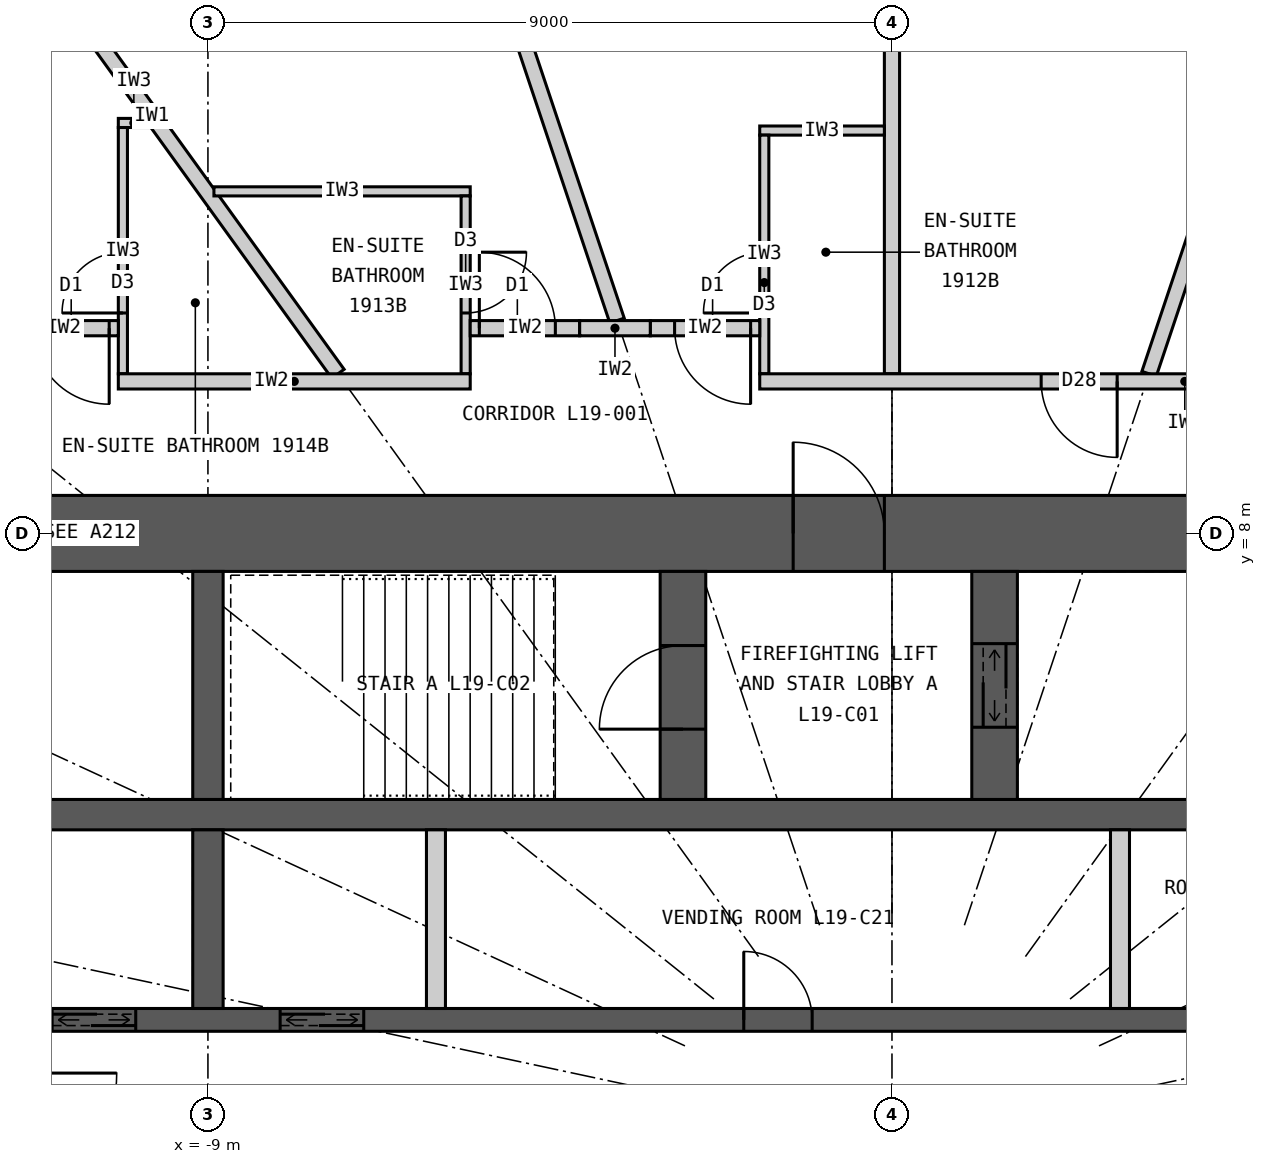
"""IFC4 building model, lengths in metres.
Left out: names, types, materials, properties, quantities, classifications, styles, units other than length and angle.
Written with IfcOpenShell. Run it as: python <this file> out.ifc"""

import sys

from ifc_helpers import new_model, si_unit, direction, frame, frame_2d, origin, place, context, subcontext, project, spatial, rectangle, extrude, element, fill, save


model = new_model("IFC4")
c1 = context("Model", 3, precision=1e-05, world=origin(), true_north=direction((0.0, 1.0)))
c2 = subcontext(c1, "Body", "Model", "MODEL_VIEW")
j1 = project(units=[si_unit("LENGTHUNIT", "METRE"), si_unit("PLANEANGLEUNIT", "RADIAN")], contexts=[c1])
p1 = place(None, origin())
s1 = spatial("IfcSite", under=j1, at=p1, CompositionType="ELEMENT")
p2 = place(p1, origin())
s2 = spatial("IfcBuilding", under=s1, at=p2, CompositionType="ELEMENT")
p3 = place(p2, frame((0.0, 0.0, 77.1)))
s3 = spatial("IfcBuildingStorey", under=s2, at=p3, CompositionType="ELEMENT", Elevation=77.1)
p4 = place(p3, frame((-12.5, 8.0, 0.0), z_axis=(0.0, 0.0, 1.0), x_axis=(1.0, 0.0, 0.0)))
e1 = element("IfcWall", 1, at=p4, inside=s3, PredefinedType="SHEAR", context=c2, shape_type="SweptSolid", body=[
    extrude(rectangle(XDim=25.0, YDim=1.0, at=frame_2d((12.5, 0.0))), origin(), (0.0, 0.0, 1.0), 3.3),
])
p5 = place(p4, frame((11.2, 0.0, 0.0)))
e2 = element("IfcOpeningElement", 2, at=p5, cuts=e1, PredefinedType="OPENING", context=c2, shape_type="SweptSolid", body=[
    extrude(rectangle(XDim=1.2, YDim=2.2, at=frame_2d((0.6, 1.1))), frame((0.0, 0.51, 0.0), z_axis=(0.0, -1.0, 0.0), x_axis=(1.0, 0.0, 0.0)), (0.0, 0.0, 1.0), 1.02),
])
p6 = place(p4, frame((18.8, 0.0, 0.0)))
e3 = element("IfcOpeningElement", 3, at=p6, cuts=e1, PredefinedType="OPENING", context=c2, shape_type="SweptSolid", body=[
    extrude(rectangle(XDim=0.9, YDim=2.2, at=frame_2d((0.45, 1.1))), frame((0.0, 0.51, 0.0), z_axis=(0.0, -1.0, 0.0), x_axis=(1.0, 0.0, 0.0)), (0.0, 0.0, 1.0), 1.02),
])
p7 = place(p3, frame((-11.5, 4.3, 0.0), z_axis=(0.0, 0.0, 1.0), x_axis=(1.0, 0.0, 0.0)))
e4 = element("IfcWall", 4, at=p7, inside=s3, PredefinedType="SHEAR", context=c2, shape_type="SweptSolid", body=[
    extrude(rectangle(XDim=23.0, YDim=0.4, at=frame_2d((11.5, 0.0))), origin(), (0.0, 0.0, 1.0), 3.3),
])
p8 = place(p3, frame((-11.5, 1.6, 0.0), z_axis=(0.0, 0.0, 1.0), x_axis=(1.0, 0.0, 0.0)))
e5 = element("IfcWall", 5, at=p8, inside=s3, PredefinedType="SHEAR", context=c2, shape_type="SweptSolid", body=[
    extrude(rectangle(XDim=23.0, YDim=0.3, at=frame_2d((11.5, 0.0))), origin(), (0.0, 0.0, 1.0), 3.3),
])
p9 = place(p8, frame((0.45, 0.0, 0.0)))
e6 = element("IfcOpeningElement", 6, at=p9, cuts=e5, PredefinedType="OPENING", context=c2, shape_type="SweptSolid", body=[
    extrude(rectangle(XDim=1.1, YDim=2.2, at=frame_2d((0.55, 1.1))), frame((0.0, 0.16, 0.0), z_axis=(0.0, -1.0, 0.0), x_axis=(1.0, 0.0, 0.0)), (0.0, 0.0, 1.0), 0.32),
])
p10 = place(p8, frame((3.45, 0.0, 0.0)))
e7 = element("IfcOpeningElement", 7, at=p10, cuts=e5, PredefinedType="OPENING", context=c2, shape_type="SweptSolid", body=[
    extrude(rectangle(XDim=1.1, YDim=2.2, at=frame_2d((0.55, 1.1))), frame((0.0, 0.16, 0.0), z_axis=(0.0, -1.0, 0.0), x_axis=(1.0, 0.0, 0.0)), (0.0, 0.0, 1.0), 0.32),
])
p11 = place(p8, frame((9.55, 0.0, 0.0)))
e8 = element("IfcOpeningElement", 8, at=p11, cuts=e5, PredefinedType="OPENING", context=c2, shape_type="SweptSolid", body=[
    extrude(rectangle(XDim=0.9, YDim=2.2, at=frame_2d((0.45, 1.1))), frame((0.0, 0.16, 0.0), z_axis=(0.0, -1.0, 0.0), x_axis=(1.0, 0.0, 0.0)), (0.0, 0.0, 1.0), 0.32),
])
p12 = place(p8, frame((15.55, 0.0, 0.0)))
e9 = element("IfcOpeningElement", 9, at=p12, cuts=e5, PredefinedType="OPENING", context=c2, shape_type="SweptSolid", body=[
    extrude(rectangle(XDim=0.9, YDim=2.2, at=frame_2d((0.45, 1.1))), frame((0.0, 0.16, 0.0), z_axis=(0.0, -1.0, 0.0), x_axis=(1.0, 0.0, 0.0)), (0.0, 0.0, 1.0), 0.32),
])
p13 = place(p3, frame((-9.0, 4.5, 0.0), z_axis=(0.0, 0.0, 1.0), x_axis=(0.0, 1.0, 0.0)))
e10 = element("IfcWall", 10, at=p13, inside=s3, PredefinedType="SHEAR", context=c2, shape_type="SweptSolid", body=[
    extrude(rectangle(XDim=3.0, YDim=0.4, at=frame_2d((1.5, 0.0))), origin(), (0.0, 0.0, 1.0), 3.3),
])
p14 = place(p3, frame((-9.0, 1.75, 0.0), z_axis=(0.0, 0.0, 1.0), x_axis=(0.0, 1.0, 0.0)))
e11 = element("IfcWall", 11, at=p14, inside=s3, PredefinedType="SHEAR", context=c2, shape_type="SweptSolid", body=[
    extrude(rectangle(XDim=2.35, YDim=0.4, at=frame_2d((1.175, 0.0))), origin(), (0.0, 0.0, 1.0), 3.3),
])
p15 = place(p3, frame((-2.75, 4.5, 0.0), z_axis=(0.0, 0.0, 1.0), x_axis=(0.0, 1.0, 0.0)))
e12 = element("IfcWall", 12, at=p15, inside=s3, PredefinedType="SHEAR", context=c2, shape_type="SweptSolid", body=[
    extrude(rectangle(XDim=3.0, YDim=0.6, at=frame_2d((1.5, 0.0))), origin(), (0.0, 0.0, 1.0), 3.3),
])
p16 = place(p15, frame((0.925, 0.0, 0.0)))
e13 = element("IfcOpeningElement", 13, at=p16, cuts=e12, PredefinedType="OPENING", context=c2, shape_type="SweptSolid", body=[
    extrude(rectangle(XDim=1.1, YDim=2.2, at=frame_2d((0.55, 1.1))), frame((0.0, 0.31, 0.0), z_axis=(0.0, -1.0, 0.0), x_axis=(1.0, 0.0, 0.0)), (0.0, 0.0, 1.0), 0.62),
])
p17 = place(p3, frame((1.35, 4.5, 0.0), z_axis=(0.0, 0.0, 1.0), x_axis=(0.0, 1.0, 0.0)))
e14 = element("IfcWall", 14, at=p17, inside=s3, PredefinedType="SHEAR", context=c2, shape_type="SweptSolid", body=[
    extrude(rectangle(XDim=3.0, YDim=0.6, at=frame_2d((1.5, 0.0))), origin(), (0.0, 0.0, 1.0), 3.3),
])
p18 = place(p17, frame((0.95, 0.0, 0.0)))
e15 = element("IfcOpeningElement", 15, at=p18, cuts=e14, PredefinedType="OPENING", context=c2, shape_type="SweptSolid", body=[
    extrude(rectangle(XDim=1.1, YDim=2.2, at=frame_2d((0.55, 1.1))), frame((0.0, 0.31, 0.0), z_axis=(0.0, -1.0, 0.0), x_axis=(1.0, 0.0, 0.0)), (0.0, 0.0, 1.0), 0.62),
])
for number, where, z_axis, x_axis in (
    (16, (-6.0, 1.75, 0.0), (0.0, 0.0, 1.0), (0.0, 1.0, 0.0)),
    (17, (3.0, 1.75, 0.0), (0.0, 0.0, 1.0), (0.0, 1.0, 0.0)),
):
    element("IfcWall", number, at=place(p3, frame(where, z_axis=z_axis, x_axis=x_axis)), inside=s3, PredefinedType="PARTITIONING", context=c2, shape_type="SweptSolid", body=[
        extrude(rectangle(XDim=2.35, YDim=0.25, at=frame_2d((1.175, 0.0))), origin(), (0.0, 0.0, 1.0), 3.3),
    ])
p19 = place(p3, frame((3.383, 10.1, 0.0), z_axis=(0.0, 0.0, 1.0), x_axis=(0.31759592231, 0.948226149256, 0.0)))
e18 = element("IfcWall", 18, at=p19, inside=s3, PredefinedType="PARTITIONING", context=c2, shape_type="SweptSolid", body=[
    extrude(rectangle(XDim=9.098, YDim=0.2, at=frame_2d((4.549, 0.0))), origin(), (0.0, 0.0, 1.0), 2.32),
])
p20 = place(p3, frame((0.0, 10.1, 0.0), z_axis=(0.0, 0.0, 1.0), x_axis=(0.0, 1.0, 0.0)))
e19 = element("IfcWall", 19, at=p20, inside=s3, PredefinedType="PARTITIONING", context=c2, shape_type="SweptSolid", body=[
    extrude(rectangle(XDim=9.25, YDim=0.2, at=frame_2d((4.625, 0.0))), origin(), (0.0, 0.0, 1.0), 2.32),
])
p21 = place(p3, frame((-3.617, 10.8, 0.0), z_axis=(0.0, 0.0, 1.0), x_axis=(-0.317576599239, 0.948232621046, 0.0)))
e20 = element("IfcWall", 20, at=p21, inside=s3, PredefinedType="PARTITIONING", context=c2, shape_type="SweptSolid", body=[
    extrude(rectangle(XDim=8.36, YDim=0.2, at=frame_2d((4.18, 0.0))), origin(), (0.0, 0.0, 1.0), 2.32),
])
p22 = place(p3, frame((-7.289, 10.1, 0.0), z_axis=(0.0, 0.0, 1.0), x_axis=(-0.585198353053, 0.810890182197, 0.0)))
e21 = element("IfcWall", 21, at=p22, inside=s3, PredefinedType="PARTITIONING", context=c2, shape_type="SweptSolid", body=[
    extrude(rectangle(XDim=8.36, YDim=0.2, at=frame_2d((4.18, 0.0))), origin(), (0.0, 0.0, 1.0), 2.32),
])
p23 = place(p3, frame((-0.1, 13.3, 0.0), z_axis=(0.0, 0.0, 1.0), x_axis=(-1.0, 0.0, 0.0)))
e22 = element("IfcWall", 22, at=p23, inside=s3, PredefinedType="PARTITIONING", context=c2, shape_type="SweptSolid", body=[
    extrude(rectangle(XDim=1.64, YDim=0.12, at=frame_2d((0.82, 0.0))), origin(), (0.0, 0.0, 1.0), 3.12),
])
p24 = place(p3, frame((-1.68, 10.1, 0.0), z_axis=(0.0, 0.0, 1.0), x_axis=(0.0, 1.0, 0.0)))
e23 = element("IfcWall", 23, at=p24, inside=s3, PredefinedType="PARTITIONING", context=c2, shape_type="SweptSolid", body=[
    extrude(rectangle(XDim=3.14, YDim=0.12, at=frame_2d((1.57, 0.0))), origin(), (0.0, 0.0, 1.0), 3.12),
])
p25 = place(p24, frame((0.8, 0.0, 0.0)))
e24 = element("IfcOpeningElement", 24, at=p25, cuts=e23, PredefinedType="OPENING", context=c2, shape_type="SweptSolid", body=[
    extrude(rectangle(XDim=0.8, YDim=2.1, at=frame_2d((0.4, 1.05))), frame((0.0, 0.07, 0.0), z_axis=(0.0, -1.0, 0.0), x_axis=(1.0, 0.0, 0.0)), (0.0, 0.0, 1.0), 0.14),
])
p26 = place(p3, frame((-8.921, 12.5, 0.0), z_axis=(0.0, 0.0, 1.0), x_axis=(1.0, 0.0, 0.0)))
e25 = element("IfcWall", 25, at=p26, inside=s3, PredefinedType="PARTITIONING", context=c2, shape_type="SweptSolid", body=[
    extrude(rectangle(XDim=3.372, YDim=0.12, at=frame_2d((1.686, 0.0))), origin(), (0.0, 0.0, 1.0), 3.12),
])
p27 = place(p3, frame((-5.609, 10.1, 0.0), z_axis=(0.0, 0.0, 1.0), x_axis=(0.0, 1.0, 0.0)))
e26 = element("IfcWall", 26, at=p27, inside=s3, PredefinedType="PARTITIONING", context=c2, shape_type="SweptSolid", body=[
    extrude(rectangle(XDim=2.34, YDim=0.12, at=frame_2d((1.17, 0.0))), origin(), (0.0, 0.0, 1.0), 3.12),
])
p28 = place(p27, frame((0.8, 0.0, 0.0)))
e27 = element("IfcOpeningElement", 27, at=p28, cuts=e26, PredefinedType="OPENING", context=c2, shape_type="SweptSolid", body=[
    extrude(rectangle(XDim=0.8, YDim=2.1, at=frame_2d((0.4, 1.05))), frame((0.0, 0.07, 0.0), z_axis=(0.0, -1.0, 0.0), x_axis=(1.0, 0.0, 0.0)), (0.0, 0.0, 1.0), 0.14),
])
p29 = place(p3, frame((-9.771, 13.4, 0.0), z_axis=(0.0, 0.0, 1.0), x_axis=(-1.0, 0.0, 0.0)))
e28 = element("IfcWall", 28, at=p29, inside=s3, PredefinedType="PARTITIONING", context=c2, shape_type="SweptSolid", body=[
    extrude(rectangle(XDim=0.408, YDim=0.12, at=frame_2d((0.204, 0.0))), origin(), (0.0, 0.0, 1.0), 3.12),
])
p30 = place(p3, frame((-10.119, 10.1, 0.0), z_axis=(0.0, 0.0, 1.0), x_axis=(0.0, 1.0, 0.0)))
e29 = element("IfcWall", 29, at=p30, inside=s3, PredefinedType="PARTITIONING", context=c2, shape_type="SweptSolid", body=[
    extrude(rectangle(XDim=3.24, YDim=0.12, at=frame_2d((1.62, 0.0))), origin(), (0.0, 0.0, 1.0), 3.12),
])
p31 = place(p30, frame((0.8, 0.0, 0.0)))
e30 = element("IfcOpeningElement", 30, at=p31, cuts=e29, PredefinedType="OPENING", context=c2, shape_type="SweptSolid", body=[
    extrude(rectangle(XDim=0.8, YDim=2.1, at=frame_2d((0.4, 1.05))), frame((0.0, 0.07, 0.0), z_axis=(0.0, -1.0, 0.0), x_axis=(1.0, 0.0, 0.0)), (0.0, 0.0, 1.0), 0.14),
])
p32 = place(p3, frame((-3.18, 10.7, 0.0), z_axis=(0.0, 0.0, 1.0), x_axis=(1.0, 0.0, 0.0)))
e31 = element("IfcWall", 31, at=p32, inside=s3, PredefinedType="PARTITIONING", context=c2, shape_type="SweptSolid", body=[
    extrude(rectangle(XDim=1.44, YDim=0.2, at=frame_2d((0.72, 0.0))), origin(), (0.0, 0.0, 1.0), 3.12),
])
p33 = place(p32, frame((0.32, 0.0, 0.0)))
e32 = element("IfcOpeningElement", 32, at=p33, cuts=e31, PredefinedType="OPENING", context=c2, shape_type="SweptSolid", body=[
    extrude(rectangle(XDim=1.0, YDim=2.2, at=frame_2d((0.5, 1.1))), frame((0.0, 0.11, 0.0), z_axis=(0.0, -1.0, 0.0), x_axis=(1.0, 0.0, 0.0)), (0.0, 0.0, 1.0), 0.22),
])
p34 = place(p3, frame((-5.549, 10.7, 0.0), z_axis=(0.0, 0.0, 1.0), x_axis=(1.0, 0.0, 0.0)))
e33 = element("IfcWall", 33, at=p34, inside=s3, PredefinedType="PARTITIONING", context=c2, shape_type="SweptSolid", body=[
    extrude(rectangle(XDim=1.44, YDim=0.2, at=frame_2d((0.72, 0.0))), origin(), (0.0, 0.0, 1.0), 3.12),
])
p35 = place(p34, frame((0.12, 0.0, 0.0)))
e34 = element("IfcOpeningElement", 34, at=p35, cuts=e33, PredefinedType="OPENING", context=c2, shape_type="SweptSolid", body=[
    extrude(rectangle(XDim=1.0, YDim=2.2, at=frame_2d((0.5, 1.1))), frame((0.0, 0.11, 0.0), z_axis=(0.0, -1.0, 0.0), x_axis=(1.0, 0.0, 0.0)), (0.0, 0.0, 1.0), 0.22),
])
p36 = place(p3, frame((-11.619, 10.7, 0.0), z_axis=(0.0, 0.0, 1.0), x_axis=(1.0, 0.0, 0.0)))
e35 = element("IfcWall", 35, at=p36, inside=s3, PredefinedType="PARTITIONING", context=c2, shape_type="SweptSolid", body=[
    extrude(rectangle(XDim=1.44, YDim=0.2, at=frame_2d((0.72, 0.0))), origin(), (0.0, 0.0, 1.0), 3.12),
])
p37 = place(p36, frame((0.32, 0.0, 0.0)))
e36 = element("IfcOpeningElement", 36, at=p37, cuts=e35, PredefinedType="OPENING", context=c2, shape_type="SweptSolid", body=[
    extrude(rectangle(XDim=1.0, YDim=2.2, at=frame_2d((0.5, 1.1))), frame((0.0, 0.11, 0.0), z_axis=(0.0, -1.0, 0.0), x_axis=(1.0, 0.0, 0.0)), (0.0, 0.0, 1.0), 0.22),
])
p38 = place(p3, frame((-4.109, 10.7, 0.0), z_axis=(0.0, 0.0, 1.0), x_axis=(1.0, 0.0, 0.0)))
e37 = element("IfcWall", 37, at=p38, inside=s3, PredefinedType="PARTITIONING", context=c2, shape_type="SweptSolid", body=[
    extrude(rectangle(XDim=0.929, YDim=0.2, at=frame_2d((0.465, 0.0))), origin(), (0.0, 0.0, 1.0), 3.12),
])
p39 = place(p3, frame((-10.179, 10.0, 0.0), z_axis=(0.0, 0.0, 1.0), x_axis=(1.0, 0.0, 0.0)))
e38 = element("IfcWall", 38, at=p39, inside=s3, PredefinedType="PARTITIONING", context=c2, shape_type="SweptSolid", body=[
    extrude(rectangle(XDim=4.63, YDim=0.2, at=frame_2d((2.315, 0.0))), origin(), (0.0, 0.0, 1.0), 3.12),
])
p40 = place(p3, frame((-1.74, 10.0, 0.0), z_axis=(0.0, 0.0, 1.0), x_axis=(1.0, 0.0, 0.0)))
e39 = element("IfcWall", 39, at=p40, inside=s3, PredefinedType="PARTITIONING", context=c2, shape_type="SweptSolid", body=[
    extrude(rectangle(XDim=11.185, YDim=0.2, at=frame_2d((5.593, 0.0))), origin(), (0.0, 0.0, 1.0), 3.12),
])
p41 = place(p40, frame((7.609, 0.0, 0.0)))
e40 = element("IfcOpeningElement", 40, at=p41, cuts=e39, PredefinedType="OPENING", context=c2, shape_type="SweptSolid", body=[
    extrude(rectangle(XDim=1.0, YDim=2.2, at=frame_2d((0.5, 1.1))), frame((0.0, 0.11, 0.0), z_axis=(0.0, -1.0, 0.0), x_axis=(1.0, 0.0, 0.0)), (0.0, 0.0, 1.0), 0.22),
])
p42 = place(p40, frame((3.703, 0.0, 0.0)))
e41 = element("IfcOpeningElement", 41, at=p42, cuts=e39, PredefinedType="OPENING", context=c2, shape_type="SweptSolid", body=[
    extrude(rectangle(XDim=1.0, YDim=2.2, at=frame_2d((0.5, 1.1))), frame((0.0, 0.11, 0.0), z_axis=(0.0, -1.0, 0.0), x_axis=(1.0, 0.0, 0.0)), (0.0, 0.0, 1.0), 0.22),
])
p43 = place(p42, origin())
e42 = element("IfcDoor", 42, at=p43, inside=s3, OperationType="SINGLE_SWING_RIGHT", PredefinedType="DOOR", context=c2, shape_type="SweptSolid", body=[
    extrude(rectangle(XDim=1.0, YDim=2.2, at=frame_2d((0.5, 1.1))), frame((0.0, 0.025, 0.0), z_axis=(0.0, -1.0, 0.0), x_axis=(1.0, 0.0, 0.0)), (0.0, 0.0, 1.0), 0.05),
])
fill(e41, e42)
p44 = place(p25, origin())
e43 = element("IfcDoor", 43, at=p44, inside=s3, OperationType="SINGLE_SWING_LEFT", PredefinedType="DOOR", context=c2, shape_type="SweptSolid", body=[
    extrude(rectangle(XDim=0.8, YDim=2.1, at=frame_2d((0.4, 1.05))), frame((0.0, 0.025, 0.0), z_axis=(0.0, -1.0, 0.0), x_axis=(1.0, 0.0, 0.0)), (0.0, 0.0, 1.0), 0.05),
])
fill(e24, e43)
p45 = place(p33, origin())
e44 = element("IfcDoor", 44, at=p45, inside=s3, OperationType="SINGLE_SWING_RIGHT", PredefinedType="DOOR", context=c2, shape_type="SweptSolid", body=[
    extrude(rectangle(XDim=1.0, YDim=2.2, at=frame_2d((0.5, 1.1))), frame((0.0, 0.025, 0.0), z_axis=(0.0, -1.0, 0.0), x_axis=(1.0, 0.0, 0.0)), (0.0, 0.0, 1.0), 0.05),
])
fill(e32, e44)
p46 = place(p28, origin())
e45 = element("IfcDoor", 45, at=p46, inside=s3, OperationType="SINGLE_SWING_RIGHT", PredefinedType="DOOR", context=c2, shape_type="SweptSolid", body=[
    extrude(rectangle(XDim=0.8, YDim=2.1, at=frame_2d((0.4, 1.05))), frame((0.0, 0.025, 0.0), z_axis=(0.0, -1.0, 0.0), x_axis=(1.0, 0.0, 0.0)), (0.0, 0.0, 1.0), 0.05),
])
fill(e27, e45)
p47 = place(p35, origin())
e46 = element("IfcDoor", 46, at=p47, inside=s3, OperationType="SINGLE_SWING_LEFT", PredefinedType="DOOR", context=c2, shape_type="SweptSolid", body=[
    extrude(rectangle(XDim=1.0, YDim=2.2, at=frame_2d((0.5, 1.1))), frame((0.0, 0.025, 0.0), z_axis=(0.0, -1.0, 0.0), x_axis=(1.0, 0.0, 0.0)), (0.0, 0.0, 1.0), 0.05),
])
fill(e34, e46)
p48 = place(p31, origin())
e47 = element("IfcDoor", 47, at=p48, inside=s3, OperationType="SINGLE_SWING_LEFT", PredefinedType="DOOR", context=c2, shape_type="SweptSolid", body=[
    extrude(rectangle(XDim=0.8, YDim=2.1, at=frame_2d((0.4, 1.05))), frame((0.0, 0.025, 0.0), z_axis=(0.0, -1.0, 0.0), x_axis=(1.0, 0.0, 0.0)), (0.0, 0.0, 1.0), 0.05),
])
fill(e30, e47)
p49 = place(p37, origin())
e48 = element("IfcDoor", 48, at=p49, inside=s3, OperationType="SINGLE_SWING_RIGHT", PredefinedType="DOOR", context=c2, shape_type="SweptSolid", body=[
    extrude(rectangle(XDim=1.0, YDim=2.2, at=frame_2d((0.5, 1.1))), frame((0.0, 0.025, 0.0), z_axis=(0.0, -1.0, 0.0), x_axis=(1.0, 0.0, 0.0)), (0.0, 0.0, 1.0), 0.05),
])
fill(e36, e48)
p50 = place(p5, origin())
e49 = element("IfcDoor", 49, at=p50, inside=s3, OperationType="SINGLE_SWING_LEFT", PredefinedType="DOOR", context=c2, shape_type="SweptSolid", body=[
    extrude(rectangle(XDim=1.2, YDim=2.2, at=frame_2d((0.6, 1.1))), frame((0.0, 0.025, 0.0), z_axis=(0.0, -1.0, 0.0), x_axis=(1.0, 0.0, 0.0)), (0.0, 0.0, 1.0), 0.05),
])
fill(e2, e49)
p51 = place(p16, origin())
e50 = element("IfcDoor", 50, at=p51, inside=s3, OperationType="SINGLE_SWING_LEFT", PredefinedType="DOOR", context=c2, shape_type="SweptSolid", body=[
    extrude(rectangle(XDim=1.1, YDim=2.2, at=frame_2d((0.55, 1.1))), frame((0.0, 0.025, 0.0), z_axis=(0.0, -1.0, 0.0), x_axis=(1.0, 0.0, 0.0)), (0.0, 0.0, 1.0), 0.05),
])
fill(e13, e50)
p52 = place(p18, origin())
e51 = element("IfcDoor", 51, at=p52, inside=s3, OperationType="DOUBLE_DOOR_SLIDING", PredefinedType="DOOR", context=c2, shape_type="SweptSolid", body=[
    extrude(rectangle(XDim=1.1, YDim=2.2, at=frame_2d((0.55, 1.1))), frame((0.0, 0.025, 0.0), z_axis=(0.0, -1.0, 0.0), x_axis=(1.0, 0.0, 0.0)), (0.0, 0.0, 1.0), 0.05),
])
fill(e15, e51)
p53 = place(p9, origin())
e52 = element("IfcDoor", 52, at=p53, inside=s3, OperationType="DOUBLE_DOOR_SLIDING", PredefinedType="DOOR", context=c2, shape_type="SweptSolid", body=[
    extrude(rectangle(XDim=1.1, YDim=2.2, at=frame_2d((0.55, 1.1))), frame((0.0, 0.025, 0.0), z_axis=(0.0, -1.0, 0.0), x_axis=(1.0, 0.0, 0.0)), (0.0, 0.0, 1.0), 0.05),
])
fill(e6, e52)
p54 = place(p10, origin())
e53 = element("IfcDoor", 53, at=p54, inside=s3, OperationType="DOUBLE_DOOR_SLIDING", PredefinedType="DOOR", context=c2, shape_type="SweptSolid", body=[
    extrude(rectangle(XDim=1.1, YDim=2.2, at=frame_2d((0.55, 1.1))), frame((0.0, 0.025, 0.0), z_axis=(0.0, -1.0, 0.0), x_axis=(1.0, 0.0, 0.0)), (0.0, 0.0, 1.0), 0.05),
])
fill(e7, e53)
p55 = place(p11, origin())
e54 = element("IfcDoor", 54, at=p55, inside=s3, OperationType="SINGLE_SWING_LEFT", PredefinedType="DOOR", context=c2, shape_type="SweptSolid", body=[
    extrude(rectangle(XDim=0.9, YDim=2.2, at=frame_2d((0.45, 1.1))), frame((0.0, 0.025, 0.0), z_axis=(0.0, -1.0, 0.0), x_axis=(1.0, 0.0, 0.0)), (0.0, 0.0, 1.0), 0.05),
])
fill(e8, e54)
save(model, sys.argv[1])
